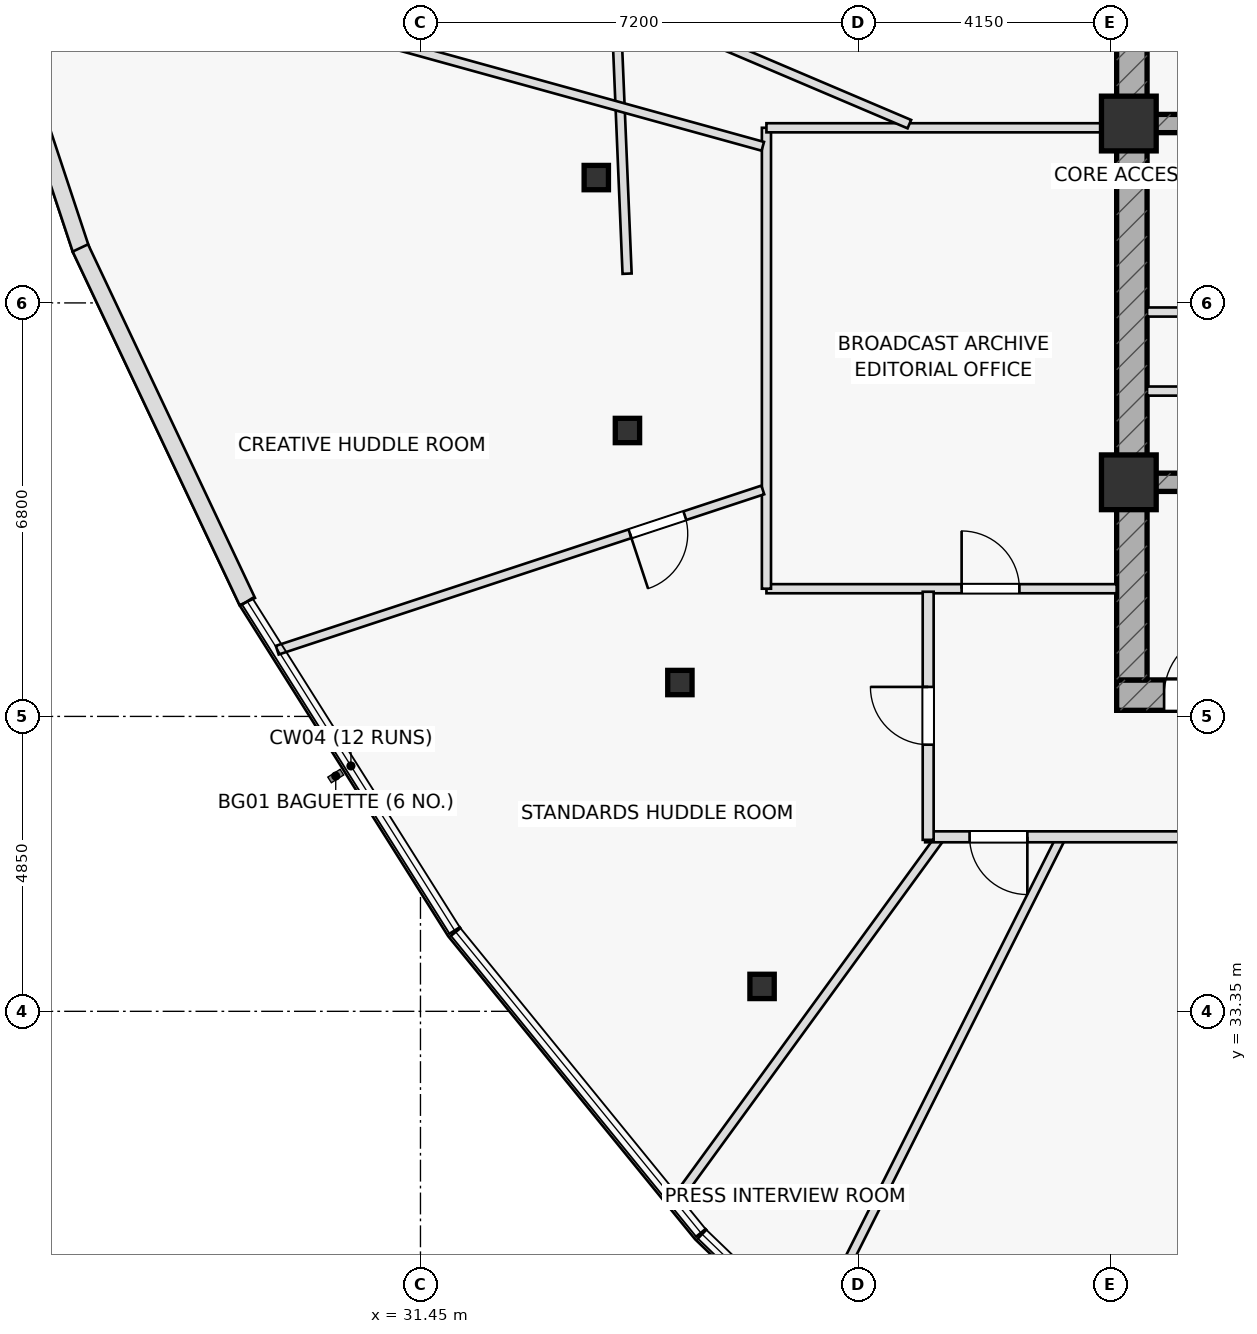
"""IFC4 building model, lengths in metres.
Left out: names, types, materials, properties, quantities, classifications, styles, units other than length and angle.
Written with IfcOpenShell. Run it as: python <this file> out.ifc"""

import sys

from ifc_helpers import new_model, si_unit, direction, frame, frame_2d, origin, origin_2d, place, context, subcontext, project, spatial, rectangle, hollow_rectangle, extrude, element, fill, save


model = new_model("IFC4")
c1 = context("Model", 3, precision=1e-05, world=origin(), true_north=direction((0.0, 1.0)))
c2 = subcontext(c1, "Body", "Model", "MODEL_VIEW")
j1 = project(units=[si_unit("LENGTHUNIT", "METRE"), si_unit("PLANEANGLEUNIT", "RADIAN")], contexts=[c1])
p1 = place(None, origin())
s1 = spatial("IfcSite", under=j1, at=p1, CompositionType="ELEMENT")
p2 = place(p1, origin())
s2 = spatial("IfcBuilding", under=s1, at=p2, CompositionType="ELEMENT")
p3 = place(p2, frame((0.0, 0.0, 321.5)))
s3 = spatial("IfcBuildingStorey", under=s2, at=p3, CompositionType="ELEMENT", Elevation=321.5)
p4 = place(p3, frame((42.9, 38.55, 0.0), z_axis=(0.0, 0.0, 1.0), x_axis=(1.0, 0.0, 0.0)))
e1 = element("IfcWall", 1, at=p4, inside=s3, PredefinedType="SHEAR", context=c2, shape_type="SweptSolid", body=[
    extrude(rectangle(XDim=14.2, YDim=0.5, at=frame_2d((7.1, 0.0))), origin(), (0.0, 0.0, 1.0), 3.55),
])
p5 = place(p4, frame((0.78, 0.0, 0.0)))
e2 = element("IfcOpeningElement", 2, at=p5, cuts=e1, PredefinedType="OPENING", context=c2, shape_type="SweptSolid", body=[
    extrude(rectangle(XDim=1.05, YDim=2.2, at=frame_2d((0.525, 1.1))), frame((0.0, 0.26, 0.0), z_axis=(0.0, -1.0, 0.0), x_axis=(1.0, 0.0, 0.0)), (0.0, 0.0, 1.0), 0.52),
])
p6 = place(p3, frame((43.15, 38.8, 0.0), z_axis=(0.0, 0.0, 1.0), x_axis=(0.0, 1.0, 0.0)))
e3 = element("IfcWall", 3, at=p6, inside=s3, PredefinedType="SHEAR", context=c2, shape_type="SweptSolid", body=[
    extrude(rectangle(XDim=12.4, YDim=0.5, at=frame_2d((6.2, 0.0))), origin(), (0.0, 0.0, 1.0), 3.55),
])
p7 = place(p3, frame((43.4, 47.95, 0.0), z_axis=(0.0, 0.0, 1.0), x_axis=(1.0, 0.0, 0.0)))
e4 = element("IfcWall", 4, at=p7, inside=s3, PredefinedType="SHEAR", context=c2, shape_type="SweptSolid", body=[
    extrude(rectangle(XDim=13.2, YDim=0.3, at=frame_2d((6.6, 0.0))), origin(), (0.0, 0.0, 1.0), 3.55),
])
p8 = place(p7, frame((8.345, 0.0, 0.0)))
e5 = element("IfcOpeningElement", 5, at=p8, cuts=e4, PredefinedType="OPENING", context=c2, shape_type="SweptSolid", body=[
    extrude(rectangle(XDim=1.15, YDim=2.2, at=frame_2d((0.575, 1.1))), frame((0.0, 0.16, 0.0), z_axis=(0.0, -1.0, 0.0), x_axis=(1.0, 0.0, 0.0)), (0.0, 0.0, 1.0), 0.32),
])
p9 = place(p7, frame((10.065, 0.0, 0.0)))
e6 = element("IfcOpeningElement", 6, at=p9, cuts=e4, PredefinedType="OPENING", context=c2, shape_type="SweptSolid", body=[
    extrude(rectangle(XDim=1.15, YDim=2.2, at=frame_2d((0.575, 1.1))), frame((0.0, 0.16, 0.0), z_axis=(0.0, -1.0, 0.0), x_axis=(1.0, 0.0, 0.0)), (0.0, 0.0, 1.0), 0.32),
])
p10 = place(p7, frame((11.645, 0.0, 0.0)))
e7 = element("IfcOpeningElement", 7, at=p10, cuts=e4, PredefinedType="OPENING", context=c2, shape_type="SweptSolid", body=[
    extrude(rectangle(XDim=1.15, YDim=2.2, at=frame_2d((0.575, 1.1))), frame((0.0, 0.16, 0.0), z_axis=(0.0, -1.0, 0.0), x_axis=(1.0, 0.0, 0.0)), (0.0, 0.0, 1.0), 0.32),
])
p11 = place(p3, frame((43.4, 42.05, 0.0), z_axis=(0.0, 0.0, 1.0), x_axis=(1.0, 0.0, 0.0)))
e8 = element("IfcWall", 8, at=p11, inside=s3, PredefinedType="SHEAR", context=c2, shape_type="SweptSolid", body=[
    extrude(rectangle(XDim=13.2, YDim=0.3, at=frame_2d((6.6, 0.0))), origin(), (0.0, 0.0, 1.0), 3.55),
])
p12 = place(p11, frame((7.45, 0.0, 0.0)))
e9 = element("IfcOpeningElement", 9, at=p12, cuts=e8, PredefinedType="OPENING", context=c2, shape_type="SweptSolid", body=[
    extrude(rectangle(XDim=0.85, YDim=2.05, at=frame_2d((0.425, 1.025))), frame((0.0, 0.16, 0.0), z_axis=(0.0, -1.0, 0.0), x_axis=(1.0, 0.0, 0.0)), (0.0, 0.0, 1.0), 0.32),
])
p13 = place(p11, frame((9.5, 0.0, 0.0)))
e10 = element("IfcOpeningElement", 10, at=p13, cuts=e8, PredefinedType="OPENING", context=c2, shape_type="SweptSolid", body=[
    extrude(rectangle(XDim=0.85, YDim=2.05, at=frame_2d((0.425, 1.025))), frame((0.0, 0.16, 0.0), z_axis=(0.0, -1.0, 0.0), x_axis=(1.0, 0.0, 0.0)), (0.0, 0.0, 1.0), 0.32),
])
p14 = place(p11, frame((11.6, 0.0, 0.0)))
e11 = element("IfcOpeningElement", 11, at=p14, cuts=e8, PredefinedType="OPENING", context=c2, shape_type="SweptSolid", body=[
    extrude(rectangle(XDim=0.85, YDim=2.05, at=frame_2d((0.425, 1.025))), frame((0.0, 0.16, 0.0), z_axis=(0.0, -1.0, 0.0), x_axis=(1.0, 0.0, 0.0)), (0.0, 0.0, 1.0), 0.32),
])
for number, where, z_axis, x_axis in (
    (12, (43.1, 47.95, 0.0), (0.0, 0.0, 1.0), (1.0, 0.0, 0.0)),
    (13, (43.1, 42.05, 0.0), (0.0, 0.0, 1.0), (1.0, 0.0, 0.0)),
):
    element("IfcColumn", number, at=place(p3, frame(where, z_axis=z_axis, x_axis=x_axis)), inside=s3, PredefinedType="COLUMN", context=c2, shape_type="SweptSolid", body=[
        extrude(rectangle(XDim=0.9, YDim=0.9, at=origin_2d()), origin(), (0.0, 0.0, 1.0), 3.55),
    ])
for number, where, z_axis, x_axis in (
    (14, (34.342, 47.061, 0.0), (0.0, 0.0, 1.0), (1.0, 0.0, 0.0)),
    (15, (34.854, 42.902, 0.0), (0.0, 0.0, 1.0), (1.0, 0.0, 0.0)),
    (16, (35.717, 38.757, 0.0), (0.0, 0.0, 1.0), (1.0, 0.0, 0.0)),
    (17, (37.068, 33.76, 0.0), (0.0, 0.0, 1.0), (1.0, 0.0, 0.0)),
):
    element("IfcColumn", number, at=place(p3, frame(where, z_axis=z_axis, x_axis=x_axis)), inside=s3, PredefinedType="COLUMN", context=c2, shape_type="SweptSolid", body=[
        extrude(hollow_rectangle(XDim=0.4, YDim=0.4, WallThickness=0.025, at=origin_2d()), origin(), (0.0, 0.0, 1.0), 3.55),
    ])
for number, where, z_axis, x_axis in (
    (18, (43.4, 43.55, 0.0), (0.0, 0.0, 1.0), (1.0, 0.0, 0.0)),
    (19, (43.4, 44.85, 0.0), (0.0, 0.0, 1.0), (1.0, 0.0, 0.0)),
):
    element("IfcWall", number, at=place(p3, frame(where, z_axis=z_axis, x_axis=x_axis)), inside=s3, PredefinedType="PARTITIONING", context=c2, shape_type="SweptSolid", body=[
        extrude(rectangle(XDim=2.35, YDim=0.15, at=frame_2d((1.175, 0.0))), origin(), (0.0, 0.0, 1.0), 3.55),
    ])
p15 = place(p3, frame((34.507, 53.613, 0.0), z_axis=(0.0, 0.0, 1.0), x_axis=(0.041875090182, -0.999122853718, 0.0)))
e20 = element("IfcWall", 20, at=p15, inside=s3, PredefinedType="PARTITIONING", context=c2, shape_type="SweptSolid", body=[
    extrude(rectangle(XDim=8.139, YDim=0.15, at=frame_2d((4.069, 0.0))), origin(), (0.0, 0.0, 1.0), 3.125),
])
p16 = place(p3, frame((37.14, 40.3, 0.0), z_axis=(0.0, 0.0, 1.0), x_axis=(1.0, 0.0, 0.0)))
e21 = element("IfcWall", 21, at=p16, inside=s3, PredefinedType="PARTITIONING", context=c2, shape_type="SweptSolid", body=[
    extrude(rectangle(XDim=5.76, YDim=0.15, at=frame_2d((2.88, 0.0))), origin(), (0.0, 0.0, 1.0), 3.075),
])
p17 = place(p16, frame((3.21, 0.0, 0.0)))
e22 = element("IfcOpeningElement", 22, at=p17, cuts=e21, PredefinedType="OPENING", context=c2, shape_type="SweptSolid", body=[
    extrude(rectangle(XDim=0.95, YDim=2.05, at=frame_2d((0.475, 1.025))), frame((0.0, 0.085, 0.0), z_axis=(0.0, -1.0, 0.0), x_axis=(1.0, 0.0, 0.0)), (0.0, 0.0, 1.0), 0.17),
])
p18 = place(p3, frame((37.14, 40.3, 0.0), z_axis=(0.0, 0.0, 1.0), x_axis=(0.0, 1.0, 0.0)))
e23 = element("IfcWall", 23, at=p18, inside=s3, PredefinedType="PARTITIONING", context=c2, shape_type="SweptSolid", body=[
    extrude(rectangle(XDim=7.58, YDim=0.15, at=frame_2d((3.79, 0.0))), origin(), (0.0, 0.0, 1.0), 3.55),
])
p19 = place(p3, frame((37.14, 47.88, 0.0), z_axis=(0.0, 0.0, 1.0), x_axis=(1.0, 0.0, 0.0)))
e24 = element("IfcWall", 24, at=p19, inside=s3, PredefinedType="PARTITIONING", context=c2, shape_type="SweptSolid", body=[
    extrude(rectangle(XDim=5.76, YDim=0.15, at=frame_2d((2.88, 0.0))), origin(), (0.0, 0.0, 1.0), 3.55),
])
p20 = place(p3, frame((39.49, 47.94, 0.0), z_axis=(0.0, 0.0, 1.0), x_axis=(-0.920160749364, 0.391540796507, 0.0)))
e25 = element("IfcWall", 25, at=p20, inside=s3, PredefinedType="PARTITIONING", context=c2, shape_type="SweptSolid", body=[
    extrude(rectangle(XDim=17.142, YDim=0.15, at=frame_2d((8.571, 0.0))), origin(), (0.0, 0.0, 1.0), 3.075),
])
p21 = place(p3, frame((37.08, 47.575, 0.0), z_axis=(0.0, 0.0, 1.0), x_axis=(-0.963875151347, 0.266354449215, 0.0)))
e26 = element("IfcWall", 26, at=p21, inside=s3, PredefinedType="PARTITIONING", context=c2, shape_type="SweptSolid", body=[
    extrude(rectangle(XDim=13.459, YDim=0.15, at=frame_2d((6.73, 0.0))), origin(), (0.0, 0.0, 1.0), 3.075),
])
p22 = place(p3, frame((37.08, 41.924, 0.0), z_axis=(0.0, 0.0, 1.0), x_axis=(-0.949625538611, -0.313386879778, 0.0)))
e27 = element("IfcWall", 27, at=p22, inside=s3, PredefinedType="PARTITIONING", context=c2, shape_type="SweptSolid", body=[
    extrude(rectangle(XDim=8.409, YDim=0.15, at=frame_2d((4.205, 0.0))), origin(), (0.0, 0.0, 1.0), 3.125),
])
p23 = place(p22, frame((1.35, 0.0, 0.0)))
e28 = element("IfcOpeningElement", 28, at=p23, cuts=e27, PredefinedType="OPENING", context=c2, shape_type="SweptSolid", body=[
    extrude(rectangle(XDim=0.95, YDim=2.05, at=frame_2d((0.475, 1.025))), frame((0.0, 0.085, 0.0), z_axis=(0.0, -1.0, 0.0), x_axis=(1.0, 0.0, 0.0)), (0.0, 0.0, 1.0), 0.17),
])
p24 = place(p3, frame((40.005, 36.22, 0.0), z_axis=(0.0, 0.0, 1.0), x_axis=(-0.58875799432, -0.808309361646, 0.0)))
e29 = element("IfcWall", 29, at=p24, inside=s3, PredefinedType="PARTITIONING", context=c2, shape_type="SweptSolid", body=[
    extrude(rectangle(XDim=7.426, YDim=0.15, at=frame_2d((3.713, 0.0))), origin(), (0.0, 0.0, 1.0), 3.075),
])
p25 = place(p3, frame((41.99, 36.22, 0.0), z_axis=(0.0, 0.0, 1.0), x_axis=(-0.448789550097, -0.893637476678, 0.0)))
e30 = element("IfcWall", 30, at=p25, inside=s3, PredefinedType="PARTITIONING", context=c2, shape_type="SweptSolid", body=[
    extrude(rectangle(XDim=9.229, YDim=0.15, at=frame_2d((4.615, 0.0))), origin(), (0.0, 0.0, 1.0), 3.125),
])
p26 = place(p3, frame((59.23, 36.22, 0.0), z_axis=(0.0, 0.0, 1.0), x_axis=(-1.0, 0.0, 0.0)))
e31 = element("IfcWall", 31, at=p26, inside=s3, PredefinedType="PARTITIONING", context=c2, shape_type="SweptSolid", body=[
    extrude(rectangle(XDim=19.48, YDim=0.18, at=frame_2d((9.74, 0.0))), origin(), (0.0, 0.0, 1.0), 3.075),
])
p27 = place(p26, frame((1.779, 0.0, 0.0)))
e32 = element("IfcOpeningElement", 32, at=p27, cuts=e31, PredefinedType="OPENING", context=c2, shape_type="SweptSolid", body=[
    extrude(rectangle(XDim=0.95, YDim=2.05, at=frame_2d((0.475, 1.025))), frame((0.0, 0.1, 0.0), z_axis=(0.0, -1.0, 0.0), x_axis=(1.0, 0.0, 0.0)), (0.0, 0.0, 1.0), 0.2),
])
p28 = place(p26, frame((7.231, 0.0, 0.0)))
e33 = element("IfcOpeningElement", 33, at=p28, cuts=e31, PredefinedType="OPENING", context=c2, shape_type="SweptSolid", body=[
    extrude(rectangle(XDim=0.95, YDim=2.05, at=frame_2d((0.475, 1.025))), frame((0.0, 0.1, 0.0), z_axis=(0.0, -1.0, 0.0), x_axis=(1.0, 0.0, 0.0)), (0.0, 0.0, 1.0), 0.2),
])
p29 = place(p26, frame((13.719, 0.0, 0.0)))
e34 = element("IfcOpeningElement", 34, at=p29, cuts=e31, PredefinedType="OPENING", context=c2, shape_type="SweptSolid", body=[
    extrude(rectangle(XDim=0.95, YDim=2.05, at=frame_2d((0.475, 1.025))), frame((0.0, 0.1, 0.0), z_axis=(0.0, -1.0, 0.0), x_axis=(1.0, 0.0, 0.0)), (0.0, 0.0, 1.0), 0.2),
])
p30 = place(p26, frame((17.799, 0.0, 0.0)))
e35 = element("IfcOpeningElement", 35, at=p30, cuts=e31, PredefinedType="OPENING", context=c2, shape_type="SweptSolid", body=[
    extrude(rectangle(XDim=0.95, YDim=2.05, at=frame_2d((0.475, 1.025))), frame((0.0, 0.1, 0.0), z_axis=(0.0, -1.0, 0.0), x_axis=(1.0, 0.0, 0.0)), (0.0, 0.0, 1.0), 0.2),
])
p31 = place(p3, frame((39.8, 36.17, 0.0), z_axis=(0.0, 0.0, 1.0), x_axis=(0.0, 1.0, 0.0)))
e36 = element("IfcWall", 36, at=p31, inside=s3, PredefinedType="PARTITIONING", context=c2, shape_type="SweptSolid", body=[
    extrude(rectangle(XDim=4.08, YDim=0.18, at=frame_2d((2.04, 0.0))), origin(), (0.0, 0.0, 1.0), 3.325),
])
p32 = place(p31, frame((1.565, 0.0, 0.0)))
e37 = element("IfcOpeningElement", 37, at=p32, cuts=e36, PredefinedType="OPENING", context=c2, shape_type="SweptSolid", body=[
    extrude(rectangle(XDim=0.95, YDim=2.05, at=frame_2d((0.475, 1.025))), frame((0.0, 0.1, 0.0), z_axis=(0.0, -1.0, 0.0), x_axis=(1.0, 0.0, 0.0)), (0.0, 0.0, 1.0), 0.2),
])
p33 = place(p3, frame((23.842, 51.993, 0.0), z_axis=(0.0, 0.0, 1.0), x_axis=(0.314363028612, -0.949302842217, 0.0)))
e38 = element("IfcWall", 38, at=p33, inside=s3, PredefinedType="STANDARD", context=c2, shape_type="SweptSolid", body=[
    extrude(rectangle(XDim=6.444, YDim=0.28, at=frame_2d((3.222, 0.0))), origin(), (0.0, 0.0, 1.0), 3.55),
])
p34 = place(p3, frame((25.856, 45.904, 0.0), z_axis=(0.0, 0.0, 1.0), x_axis=(0.426935605185, -0.904282029582, 0.0)))
e39 = element("IfcWall", 39, at=p34, inside=s3, PredefinedType="STANDARD", context=c2, shape_type="SweptSolid", body=[
    extrude(rectangle(XDim=6.432, YDim=0.28, at=frame_2d((3.216, 0.0))), origin(), (0.0, 0.0, 1.0), 3.55),
])
p35 = place(p5, origin())
e40 = element("IfcDoor", 40, at=p35, inside=s3, OperationType="SINGLE_SWING_RIGHT", PredefinedType="DOOR", context=c2, shape_type="SweptSolid", body=[
    extrude(rectangle(XDim=1.05, YDim=2.2, at=frame_2d((0.525, 1.1))), frame((0.0, 0.025, 0.0), z_axis=(0.0, -1.0, 0.0), x_axis=(1.0, 0.0, 0.0)), (0.0, 0.0, 1.0), 0.05),
])
fill(e2, e40)
p36 = place(p17, origin())
e41 = element("IfcDoor", 41, at=p36, inside=s3, OperationType="SINGLE_SWING_LEFT", PredefinedType="DOOR", context=c2, shape_type="SweptSolid", body=[
    extrude(rectangle(XDim=0.95, YDim=2.05, at=frame_2d((0.475, 1.025))), frame((0.0, 0.025, 0.0), z_axis=(0.0, -1.0, 0.0), x_axis=(1.0, 0.0, 0.0)), (0.0, 0.0, 1.0), 0.05),
])
fill(e22, e41)
p37 = place(p23, origin())
e42 = element("IfcDoor", 42, at=p37, inside=s3, OperationType="SINGLE_SWING_RIGHT", PredefinedType="DOOR", context=c2, shape_type="SweptSolid", body=[
    extrude(rectangle(XDim=0.95, YDim=2.05, at=frame_2d((0.475, 1.025))), frame((0.0, 0.025, 0.0), z_axis=(0.0, -1.0, 0.0), x_axis=(1.0, 0.0, 0.0)), (0.0, 0.0, 1.0), 0.05),
])
fill(e28, e42)
p38 = place(p30, origin())
e43 = element("IfcDoor", 43, at=p38, inside=s3, OperationType="SINGLE_SWING_LEFT", PredefinedType="DOOR", context=c2, shape_type="SweptSolid", body=[
    extrude(rectangle(XDim=0.95, YDim=2.05, at=frame_2d((0.475, 1.025))), frame((0.0, 0.025, 0.0), z_axis=(0.0, -1.0, 0.0), x_axis=(1.0, 0.0, 0.0)), (0.0, 0.0, 1.0), 0.05),
])
fill(e35, e43)
p39 = place(p32, origin())
e44 = element("IfcDoor", 44, at=p39, inside=s3, OperationType="SINGLE_SWING_RIGHT", PredefinedType="DOOR", context=c2, shape_type="SweptSolid", body=[
    extrude(rectangle(XDim=0.95, YDim=2.05, at=frame_2d((0.475, 1.025))), frame((0.0, 0.025, 0.0), z_axis=(0.0, -1.0, 0.0), x_axis=(1.0, 0.0, 0.0)), (0.0, 0.0, 1.0), 0.05),
])
fill(e37, e44)
save(model, sys.argv[1])
